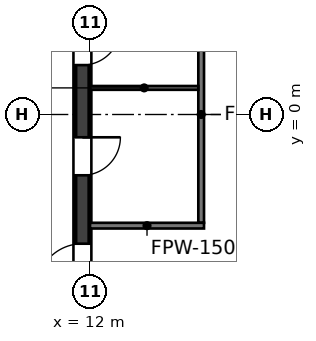
"""IFC4 building model, lengths in metres.
Left out: names, types, materials, properties, quantities, classifications, styles, units other than length and angle.
Written with IfcOpenShell. Run it as: python <this file> out.ifc"""

import sys

from ifc_helpers import new_model, si_unit, direction, frame, frame_2d, origin, place, context, subcontext, project, spatial, rectangle, extrude, element, fill, save


model = new_model("IFC4")
c1 = context("Model", 3, precision=1e-05, world=origin(), true_north=direction((0.0, 1.0)))
c2 = subcontext(c1, "Body", "Model", "MODEL_VIEW")
j1 = project(units=[si_unit("LENGTHUNIT", "METRE"), si_unit("PLANEANGLEUNIT", "RADIAN")], contexts=[c1])
p1 = place(None, origin())
s1 = spatial("IfcSite", under=j1, at=p1, CompositionType="ELEMENT")
p2 = place(p1, origin())
s2 = spatial("IfcBuilding", under=s1, at=p2, CompositionType="ELEMENT")
p3 = place(p2, frame((0.0, 0.0, 225.6)))
s3 = spatial("IfcBuildingStorey", under=s2, at=p3, CompositionType="ELEMENT", Elevation=225.6)
p4 = place(p3, frame((11.8, -5.5, 0.0), z_axis=(0.0, 0.0, 1.0), x_axis=(0.0, 1.0, 0.0)))
e1 = element("IfcWall", 1, at=p4, inside=s3, PredefinedType="SHEAR", context=c2, shape_type="SweptSolid", body=[
    extrude(rectangle(XDim=11.0, YDim=0.4, at=frame_2d((5.5, 0.0))), origin(), (0.0, 0.0, 1.0), 4.0),
])
p5 = place(p4, frame((3.9, 0.0, 0.0)))
e2 = element("IfcOpeningElement", 2, at=p5, cuts=e1, PredefinedType="OPENING", context=c2, shape_type="SweptSolid", body=[
    extrude(rectangle(XDim=1.0, YDim=2.1, at=frame_2d((0.5, 1.05))), frame((0.0, 0.2, 0.0), z_axis=(0.0, -1.0, 0.0), x_axis=(1.0, 0.0, 0.0)), (0.0, 0.0, 1.0), 0.4),
])
p6 = place(p4, frame((6.8, 0.0, 0.0)))
e3 = element("IfcOpeningElement", 3, at=p6, cuts=e1, PredefinedType="OPENING", context=c2, shape_type="SweptSolid", body=[
    extrude(rectangle(XDim=1.0, YDim=2.1, at=frame_2d((0.5, 1.05))), frame((0.0, 0.2, 0.0), z_axis=(0.0, -1.0, 0.0), x_axis=(1.0, 0.0, 0.0)), (0.0, 0.0, 1.0), 0.4),
])
p7 = place(p4, frame((0.9, 0.0, 0.0)))
e4 = element("IfcOpeningElement", 4, at=p7, cuts=e1, PredefinedType="OPENING", context=c2, shape_type="SweptSolid", body=[
    extrude(rectangle(XDim=1.2, YDim=2.1, at=frame_2d((0.6, 1.05))), frame((0.0, 0.2, 0.0), z_axis=(0.0, -1.0, 0.0), x_axis=(1.0, 0.0, 0.0)), (0.0, 0.0, 1.0), 0.4),
])
p8 = place(p4, frame((8.9, 0.0, 0.0)))
e5 = element("IfcOpeningElement", 5, at=p8, cuts=e1, PredefinedType="OPENING", context=c2, shape_type="SweptSolid", body=[
    extrude(rectangle(XDim=1.2, YDim=2.1, at=frame_2d((0.6, 1.05))), frame((0.0, 0.2, 0.0), z_axis=(0.0, -1.0, 0.0), x_axis=(1.0, 0.0, 0.0)), (0.0, 0.0, 1.0), 0.4),
])
p9 = place(p3, frame((14.925, -2.85, 0.0), z_axis=(0.0, 0.0, 1.0), x_axis=(0.0, 1.0, 0.0)))
e6 = element("IfcWall", 6, at=p9, inside=s3, PredefinedType="PARTITIONING", context=c2, shape_type="SweptSolid", body=[
    extrude(rectangle(XDim=5.7, YDim=0.15, at=frame_2d((2.85, 0.0))), origin(), (0.0, 0.0, 1.0), 2.918),
])
p10 = place(p3, frame((12.0, -2.925, 0.0), z_axis=(0.0, 0.0, 1.0), x_axis=(1.0, 0.0, 0.0)))
e7 = element("IfcWall", 7, at=p10, inside=s3, PredefinedType="PARTITIONING", context=c2, shape_type="SweptSolid", body=[
    extrude(rectangle(XDim=3.0, YDim=0.15, at=frame_2d((1.5, 0.0))), origin(), (0.0, 0.0, 1.0), 2.918),
])
p11 = place(p3, frame((12.0, 0.7, 0.0), z_axis=(0.0, 0.0, 1.0), x_axis=(1.0, 0.0, 0.0)))
e8 = element("IfcWall", 8, at=p11, inside=s3, PredefinedType="PARTITIONING", context=c2, shape_type="SweptSolid", body=[
    extrude(rectangle(XDim=2.85, YDim=0.1, at=frame_2d((1.425, 0.0))), origin(), (0.0, 0.0, 1.0), 2.918),
])
p12 = place(p5, origin())
e9 = element("IfcDoor", 9, at=p12, inside=s3, OperationType="SINGLE_SWING_RIGHT", PredefinedType="DOOR", context=c2, shape_type="SweptSolid", body=[
    extrude(rectangle(XDim=1.0, YDim=2.1, at=frame_2d((0.5, 1.05))), frame((0.0, 0.025, 0.0), z_axis=(0.0, -1.0, 0.0), x_axis=(1.0, 0.0, 0.0)), (0.0, 0.0, 1.0), 0.05),
])
fill(e2, e9)
p13 = place(p6, origin())
e10 = element("IfcDoor", 10, at=p13, inside=s3, OperationType="SINGLE_SWING_RIGHT", PredefinedType="DOOR", context=c2, shape_type="SweptSolid", body=[
    extrude(rectangle(XDim=1.0, YDim=2.1, at=frame_2d((0.5, 1.05))), frame((0.0, 0.025, 0.0), z_axis=(0.0, -1.0, 0.0), x_axis=(1.0, 0.0, 0.0)), (0.0, 0.0, 1.0), 0.05),
])
fill(e3, e10)
p14 = place(p7, origin())
e11 = element("IfcDoor", 11, at=p14, inside=s3, OperationType="SINGLE_SWING_LEFT", PredefinedType="DOOR", context=c2, shape_type="SweptSolid", body=[
    extrude(rectangle(XDim=1.2, YDim=2.1, at=frame_2d((0.6, 1.05))), frame((0.0, 0.025, 0.0), z_axis=(0.0, -1.0, 0.0), x_axis=(1.0, 0.0, 0.0)), (0.0, 0.0, 1.0), 0.05),
])
fill(e4, e11)
save(model, sys.argv[1])
